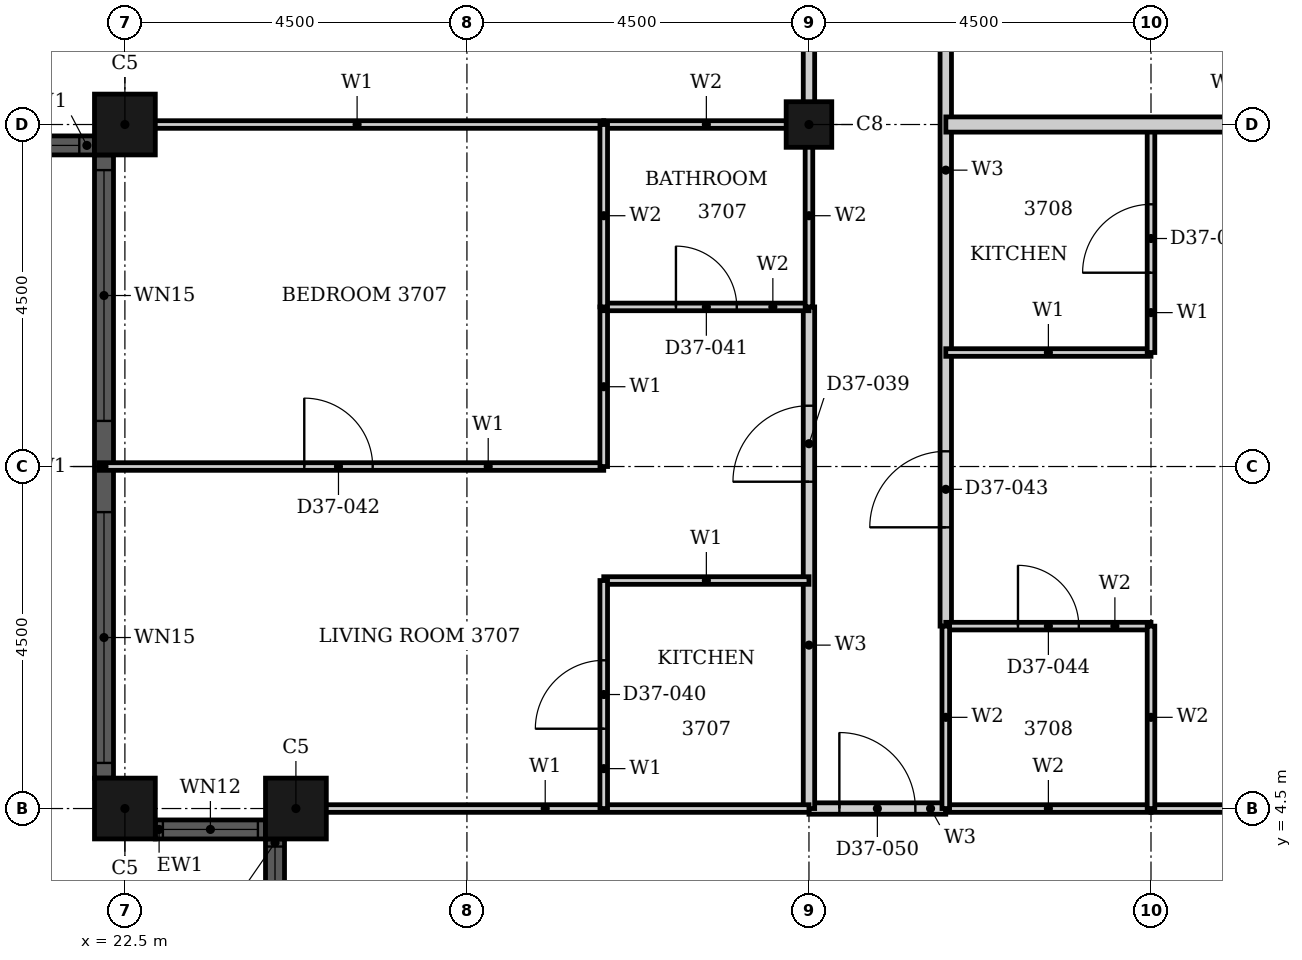
"""IFC4 building model, lengths in metres.
Left out: names, types, materials, properties, quantities, classifications, styles, units other than length and angle.
Written with IfcOpenShell. Run it as: python <this file> out.ifc"""

import sys

from ifc_helpers import new_model, si_unit, direction, frame, frame_2d, origin, origin_2d, place, context, subcontext, project, spatial, rectangle, hollow_rectangle, extrude, element, fill, save


model = new_model("IFC4")
c1 = context("Model", 3, precision=1e-05, world=origin(), true_north=direction((0.0, 1.0)))
c2 = subcontext(c1, "Body", "Model", "MODEL_VIEW")
j1 = project(units=[si_unit("LENGTHUNIT", "METRE"), si_unit("PLANEANGLEUNIT", "RADIAN")], contexts=[c1])
p1 = place(None, origin())
s1 = spatial("IfcSite", under=j1, at=p1, CompositionType="ELEMENT")
p2 = place(p1, origin())
s2 = spatial("IfcBuilding", under=s1, at=p2, CompositionType="ELEMENT")
p3 = place(p2, frame((0.0, 0.0, 150.6)))
s3 = spatial("IfcBuildingStorey", under=s2, at=p3, CompositionType="ELEMENT", Elevation=150.6)
for number, where, z_axis, x_axis in (
    (1, (22.5, 4.5, 0.0), (0.0, 0.0, 1.0), (1.0, 0.0, 0.0)),
    (2, (24.75, 4.5, 0.0), (0.0, 0.0, 1.0), (1.0, 0.0, 0.0)),
    (3, (22.5, 13.5, 0.0), (0.0, 0.0, 1.0), (1.0, 0.0, 0.0)),
):
    element("IfcColumn", number, at=place(p3, frame(where, z_axis=z_axis, x_axis=x_axis)), inside=s3, PredefinedType="COLUMN", context=c2, shape_type="SweptSolid", body=[
        extrude(hollow_rectangle(XDim=0.8, YDim=0.8, WallThickness=0.025, at=origin_2d()), origin(), (0.0, 0.0, 1.0), 3.7),
    ])
p4 = place(p3, frame((31.5, 13.5, 0.0), z_axis=(0.0, 0.0, 1.0), x_axis=(1.0, 0.0, 0.0)))
e4 = element("IfcColumn", 4, at=p4, inside=s3, PredefinedType="COLUMN", context=c2, shape_type="SweptSolid", body=[
    extrude(hollow_rectangle(XDim=0.6, YDim=0.6, WallThickness=0.02, at=origin_2d()), origin(), (0.0, 0.0, 1.0), 3.7),
])
p5 = place(p3, frame((22.9, 4.225, 0.0), z_axis=(0.0, 0.0, 1.0), x_axis=(1.0, 0.0, 0.0)))
e5 = element("IfcWall", 5, at=p5, inside=s3, PredefinedType="SOLIDWALL", context=c2, shape_type="SweptSolid", body=[
    extrude(rectangle(XDim=1.45, YDim=0.25, at=frame_2d((0.725, 0.0))), origin(), (0.0, 0.0, 1.0), 3.7),
])
p6 = place(p5, frame((0.1, 0.0, 0.9)))
e6 = element("IfcOpeningElement", 6, at=p6, cuts=e5, PredefinedType="OPENING", context=c2, shape_type="SweptSolid", body=[
    extrude(rectangle(XDim=1.25, YDim=2.08, at=frame_2d((0.625, 1.04))), frame((0.0, 0.135, 0.0), z_axis=(0.0, -1.0, 0.0), x_axis=(1.0, 0.0, 0.0)), (0.0, 0.0, 1.0), 0.27),
])
p7 = place(p3, frame((24.475, 4.1, 0.0), z_axis=(0.0, 0.0, 1.0), x_axis=(0.0, -1.0, 0.0)))
e7 = element("IfcWall", 7, at=p7, inside=s3, PredefinedType="SOLIDWALL", context=c2, shape_type="SweptSolid", body=[
    extrude(rectangle(XDim=1.45, YDim=0.25, at=frame_2d((0.725, 0.0))), origin(), (0.0, 0.0, 1.0), 3.7),
])
p8 = place(p7, frame((0.1, 0.0, 0.9)))
e8 = element("IfcOpeningElement", 8, at=p8, cuts=e7, PredefinedType="OPENING", context=c2, shape_type="SweptSolid", body=[
    extrude(rectangle(XDim=1.25, YDim=1.85, at=frame_2d((0.625, 0.925))), frame((0.0, 0.135, 0.0), z_axis=(0.0, -1.0, 0.0), x_axis=(1.0, 0.0, 0.0)), (0.0, 0.0, 1.0), 0.27),
])
p9 = place(p3, frame((18.4, 13.225, 0.0), z_axis=(0.0, 0.0, 1.0), x_axis=(1.0, 0.0, 0.0)))
e9 = element("IfcWall", 9, at=p9, inside=s3, PredefinedType="SOLIDWALL", context=c2, shape_type="SweptSolid", body=[
    extrude(rectangle(XDim=3.7, YDim=0.25, at=frame_2d((1.85, 0.0))), origin(), (0.0, 0.0, 1.0), 3.7),
])
p10 = place(p9, frame((0.2, 0.0, 0.45)))
e10 = element("IfcOpeningElement", 10, at=p10, cuts=e9, PredefinedType="OPENING", context=c2, shape_type="SweptSolid", body=[
    extrude(rectangle(XDim=3.3, YDim=2.3, at=frame_2d((1.65, 1.15))), frame((0.0, 0.135, 0.0), z_axis=(0.0, -1.0, 0.0), x_axis=(1.0, 0.0, 0.0)), (0.0, 0.0, 1.0), 0.27),
])
p11 = place(p3, frame((22.225, 13.1, 0.0), z_axis=(0.0, 0.0, 1.0), x_axis=(0.0, -1.0, 0.0)))
e11 = element("IfcWall", 11, at=p11, inside=s3, PredefinedType="SOLIDWALL", context=c2, shape_type="SweptSolid", body=[
    extrude(rectangle(XDim=8.2, YDim=0.25, at=frame_2d((4.1, 0.0))), origin(), (0.0, 0.0, 1.0), 3.7),
])
p12 = place(p11, frame((0.2, 0.0, 0.45)))
e12 = element("IfcOpeningElement", 12, at=p12, cuts=e11, PredefinedType="OPENING", context=c2, shape_type="SweptSolid", body=[
    extrude(rectangle(XDim=3.3, YDim=2.3, at=frame_2d((1.65, 1.15))), frame((0.0, 0.135, 0.0), z_axis=(0.0, -1.0, 0.0), x_axis=(1.0, 0.0, 0.0)), (0.0, 0.0, 1.0), 0.27),
])
p13 = place(p11, frame((4.7, 0.0, 0.45)))
e13 = element("IfcOpeningElement", 13, at=p13, cuts=e11, PredefinedType="OPENING", context=c2, shape_type="SweptSolid", body=[
    extrude(rectangle(XDim=3.3, YDim=2.3, at=frame_2d((1.65, 1.15))), frame((0.0, 0.135, 0.0), z_axis=(0.0, -1.0, 0.0), x_axis=(1.0, 0.0, 0.0)), (0.0, 0.0, 1.0), 0.27),
])
p14 = place(p3, frame((31.5, 4.5, 0.0), z_axis=(0.0, 0.0, 1.0), x_axis=(1.0, 0.0, 0.0)))
e14 = element("IfcWall", 14, at=p14, inside=s3, PredefinedType="PARTITIONING", context=c2, shape_type="SweptSolid", body=[
    extrude(rectangle(XDim=1.8, YDim=0.15, at=frame_2d((0.9, 0.0))), origin(), (0.0, 0.0, 1.0), 3.4),
])
p15 = place(p14, frame((0.4, 0.0, 0.0)))
e15 = element("IfcOpeningElement", 15, at=p15, cuts=e14, PredefinedType="OPENING", context=c2, shape_type="SweptSolid", body=[
    extrude(rectangle(XDim=1.0, YDim=2.1, at=frame_2d((0.5, 1.05))), frame((0.0, 0.085, 0.0), z_axis=(0.0, -1.0, 0.0), x_axis=(1.0, 0.0, 0.0)), (0.0, 0.0, 1.0), 0.17),
])
p16 = place(p3, frame((31.5, 4.5, 0.0), z_axis=(0.0, 0.0, 1.0), x_axis=(0.0, 1.0, 0.0)))
e16 = element("IfcWall", 16, at=p16, inside=s3, PredefinedType="PARTITIONING", context=c2, shape_type="SweptSolid", body=[
    extrude(rectangle(XDim=6.6, YDim=0.15, at=frame_2d((3.3, 0.0))), origin(), (0.0, 0.0, 1.0), 2.68),
])
p17 = place(p16, frame((4.3, 0.0, 0.0)))
e17 = element("IfcOpeningElement", 17, at=p17, cuts=e16, PredefinedType="OPENING", context=c2, shape_type="SweptSolid", body=[
    extrude(rectangle(XDim=1.0, YDim=2.2, at=frame_2d((0.5, 1.1))), frame((0.0, 0.085, 0.0), z_axis=(0.0, -1.0, 0.0), x_axis=(1.0, 0.0, 0.0)), (0.0, 0.0, 1.0), 0.17),
])
p18 = place(p3, frame((31.5, 13.5, 0.0), z_axis=(0.0, 0.0, 1.0), x_axis=(0.0, 1.0, 0.0)))
e18 = element("IfcWall", 18, at=p18, inside=s3, PredefinedType="PARTITIONING", context=c2, shape_type="SweptSolid", body=[
    extrude(rectangle(XDim=7.2, YDim=0.15, at=frame_2d((3.6, 0.0))), origin(), (0.0, 0.0, 1.0), 3.4),
])
p19 = place(p3, frame((33.3, 6.9, 0.0), z_axis=(0.0, 0.0, 1.0), x_axis=(0.0, 1.0, 0.0)))
e19 = element("IfcWall", 19, at=p19, inside=s3, PredefinedType="PARTITIONING", context=c2, shape_type="SweptSolid", body=[
    extrude(rectangle(XDim=13.799, YDim=0.15, at=frame_2d((6.899, 0.0))), origin(), (0.0, 0.0, 1.0), 3.4),
])
p20 = place(p19, frame((9.699, 0.0, 0.0)))
e20 = element("IfcOpeningElement", 20, at=p20, cuts=e19, PredefinedType="OPENING", context=c2, shape_type="SweptSolid", body=[
    extrude(rectangle(XDim=1.0, YDim=2.2, at=frame_2d((0.5, 1.1))), frame((0.0, 0.085, 0.0), z_axis=(0.0, -1.0, 0.0), x_axis=(1.0, 0.0, 0.0)), (0.0, 0.0, 1.0), 0.17),
])
p21 = place(p19, frame((1.3, 0.0, 0.0)))
e21 = element("IfcOpeningElement", 21, at=p21, cuts=e19, PredefinedType="OPENING", context=c2, shape_type="SweptSolid", body=[
    extrude(rectangle(XDim=1.0, YDim=2.2, at=frame_2d((0.5, 1.1))), frame((0.0, 0.085, 0.0), z_axis=(0.0, -1.0, 0.0), x_axis=(1.0, 0.0, 0.0)), (0.0, 0.0, 1.0), 0.17),
])
p22 = place(p3, frame((33.3, 10.5, 0.0), z_axis=(0.0, 0.0, 1.0), x_axis=(1.0, 0.0, 0.0)))
e22 = element("IfcWall", 22, at=p22, inside=s3, PredefinedType="PARTITIONING", context=c2, shape_type="SweptSolid", body=[
    extrude(rectangle(XDim=2.7, YDim=0.1, at=frame_2d((1.35, 0.0))), origin(), (0.0, 0.0, 1.0), 3.4),
])
p23 = place(p3, frame((22.31, 13.5, 0.0), z_axis=(0.0, 0.0, 1.0), x_axis=(1.0, 0.0, 0.0)))
e23 = element("IfcWall", 23, at=p23, inside=s3, PredefinedType="PARTITIONING", context=c2, shape_type="SweptSolid", body=[
    extrude(rectangle(XDim=6.49, YDim=0.1, at=frame_2d((3.245, 0.0))), origin(), (0.0, 0.0, 1.0), 2.48),
])
p24 = place(p3, frame((36.0, 4.5, 0.0), z_axis=(0.0, 0.0, 1.0), x_axis=(1.0, 0.0, 0.0)))
e24 = element("IfcWall", 24, at=p24, inside=s3, PredefinedType="PARTITIONING", context=c2, shape_type="SweptSolid", body=[
    extrude(rectangle(XDim=2.44, YDim=0.1, at=frame_2d((1.22, 0.0))), origin(), (0.0, 0.0, 1.0), 3.4),
])
p25 = place(p3, frame((24.56, 4.5, 0.0), z_axis=(0.0, 0.0, 1.0), x_axis=(1.0, 0.0, 0.0)))
e25 = element("IfcWall", 25, at=p25, inside=s3, PredefinedType="PARTITIONING", context=c2, shape_type="SweptSolid", body=[
    extrude(rectangle(XDim=6.94, YDim=0.1, at=frame_2d((3.47, 0.0))), origin(), (0.0, 0.0, 1.0), 3.4),
])
p26 = place(p3, frame((28.8, 7.5, 0.0), z_axis=(0.0, 0.0, 1.0), x_axis=(1.0, 0.0, 0.0)))
e26 = element("IfcWall", 26, at=p26, inside=s3, PredefinedType="PARTITIONING", context=c2, shape_type="SweptSolid", body=[
    extrude(rectangle(XDim=2.7, YDim=0.1, at=frame_2d((1.35, 0.0))), origin(), (0.0, 0.0, 1.0), 3.4),
])
p27 = place(p3, frame((22.16, 9.0, 0.0), z_axis=(0.0, 0.0, 1.0), x_axis=(1.0, 0.0, 0.0)))
e27 = element("IfcWall", 27, at=p27, inside=s3, PredefinedType="PARTITIONING", context=c2, shape_type="SweptSolid", body=[
    extrude(rectangle(XDim=6.64, YDim=0.1, at=frame_2d((3.32, 0.0))), origin(), (0.0, 0.0, 1.0), 3.4),
])
p28 = place(p27, frame((2.7, 0.0, 0.0)))
e28 = element("IfcOpeningElement", 28, at=p28, cuts=e27, PredefinedType="OPENING", context=c2, shape_type="SweptSolid", body=[
    extrude(rectangle(XDim=0.9, YDim=2.1, at=frame_2d((0.45, 1.05))), frame((0.0, 0.06, 0.0), z_axis=(0.0, -1.0, 0.0), x_axis=(1.0, 0.0, 0.0)), (0.0, 0.0, 1.0), 0.12),
])
p29 = place(p3, frame((28.8, 9.0, 0.0), z_axis=(0.0, 0.0, 1.0), x_axis=(0.0, 1.0, 0.0)))
e29 = element("IfcWall", 29, at=p29, inside=s3, PredefinedType="PARTITIONING", context=c2, shape_type="SweptSolid", body=[
    extrude(rectangle(XDim=2.1, YDim=0.1, at=frame_2d((1.05, 0.0))), origin(), (0.0, 0.0, 1.0), 3.4),
])
p30 = place(p3, frame((28.8, 4.5, 0.0), z_axis=(0.0, 0.0, 1.0), x_axis=(0.0, 1.0, 0.0)))
e30 = element("IfcWall", 30, at=p30, inside=s3, PredefinedType="PARTITIONING", context=c2, shape_type="SweptSolid", body=[
    extrude(rectangle(XDim=3.0, YDim=0.1, at=frame_2d((1.5, 0.0))), origin(), (0.0, 0.0, 1.0), 3.4),
])
p31 = place(p30, frame((1.05, 0.0, 0.0)))
e31 = element("IfcOpeningElement", 31, at=p31, cuts=e30, PredefinedType="OPENING", context=c2, shape_type="SweptSolid", body=[
    extrude(rectangle(XDim=0.9, YDim=2.1, at=frame_2d((0.45, 1.05))), frame((0.0, 0.06, 0.0), z_axis=(0.0, -1.0, 0.0), x_axis=(1.0, 0.0, 0.0)), (0.0, 0.0, 1.0), 0.12),
])
p32 = place(p3, frame((36.0, 10.5, 0.0), z_axis=(0.0, 0.0, 1.0), x_axis=(0.0, 1.0, 0.0)))
e32 = element("IfcWall", 32, at=p32, inside=s3, PredefinedType="PARTITIONING", context=c2, shape_type="SweptSolid", body=[
    extrude(rectangle(XDim=3.0, YDim=0.1, at=frame_2d((1.5, 0.0))), origin(), (0.0, 0.0, 1.0), 2.68),
])
p33 = place(p32, frame((1.05, 0.0, 0.0)))
e33 = element("IfcOpeningElement", 33, at=p33, cuts=e32, PredefinedType="OPENING", context=c2, shape_type="SweptSolid", body=[
    extrude(rectangle(XDim=0.9, YDim=2.1, at=frame_2d((0.45, 1.05))), frame((0.0, 0.06, 0.0), z_axis=(0.0, -1.0, 0.0), x_axis=(1.0, 0.0, 0.0)), (0.0, 0.0, 1.0), 0.12),
])
p34 = place(p3, frame((33.301, 13.5, 0.0), z_axis=(0.0, 0.0, 1.0), x_axis=(1.0, 0.0, 0.0)))
e34 = element("IfcWall", 34, at=p34, inside=s3, PredefinedType="PARTITIONING", context=c2, shape_type="SweptSolid", body=[
    extrude(rectangle(XDim=7.389, YDim=0.2, at=frame_2d((3.694, 0.0))), origin(), (0.0, 0.0, 1.0), 2.48),
])
p35 = place(p3, frame((28.8, 11.1, 0.0), z_axis=(0.0, 0.0, 1.0), x_axis=(1.0, 0.0, 0.0)))
e35 = element("IfcWall", 35, at=p35, inside=s3, PredefinedType="PARTITIONING", context=c2, shape_type="SweptSolid", body=[
    extrude(rectangle(XDim=2.7, YDim=0.1, at=frame_2d((1.35, 0.0))), origin(), (0.0, 0.0, 1.0), 3.4),
])
p36 = place(p35, frame((0.95, 0.0, 0.0)))
e36 = element("IfcOpeningElement", 36, at=p36, cuts=e35, PredefinedType="OPENING", context=c2, shape_type="SweptSolid", body=[
    extrude(rectangle(XDim=0.8, YDim=2.1, at=frame_2d((0.4, 1.05))), frame((0.0, 0.06, 0.0), z_axis=(0.0, -1.0, 0.0), x_axis=(1.0, 0.0, 0.0)), (0.0, 0.0, 1.0), 0.12),
])
p37 = place(p3, frame((28.8, 13.5, 0.0), z_axis=(0.0, 0.0, 1.0), x_axis=(1.0, 0.0, 0.0)))
e37 = element("IfcWall", 37, at=p37, inside=s3, PredefinedType="PARTITIONING", context=c2, shape_type="SweptSolid", body=[
    extrude(rectangle(XDim=2.7, YDim=0.1, at=frame_2d((1.35, 0.0))), origin(), (0.0, 0.0, 1.0), 2.48),
])
p38 = place(p3, frame((33.3, 4.5, 0.0), z_axis=(0.0, 0.0, 1.0), x_axis=(1.0, 0.0, 0.0)))
e38 = element("IfcWall", 38, at=p38, inside=s3, PredefinedType="PARTITIONING", context=c2, shape_type="SweptSolid", body=[
    extrude(rectangle(XDim=2.7, YDim=0.1, at=frame_2d((1.35, 0.0))), origin(), (0.0, 0.0, 1.0), 3.4),
])
p39 = place(p3, frame((33.3, 6.9, 0.0), z_axis=(0.0, 0.0, 1.0), x_axis=(1.0, 0.0, 0.0)))
e39 = element("IfcWall", 39, at=p39, inside=s3, PredefinedType="PARTITIONING", context=c2, shape_type="SweptSolid", body=[
    extrude(rectangle(XDim=2.7, YDim=0.1, at=frame_2d((1.35, 0.0))), origin(), (0.0, 0.0, 1.0), 3.4),
])
p40 = place(p39, frame((0.95, 0.0, 0.0)))
e40 = element("IfcOpeningElement", 40, at=p40, cuts=e39, PredefinedType="OPENING", context=c2, shape_type="SweptSolid", body=[
    extrude(rectangle(XDim=0.8, YDim=2.1, at=frame_2d((0.4, 1.05))), frame((0.0, 0.06, 0.0), z_axis=(0.0, -1.0, 0.0), x_axis=(1.0, 0.0, 0.0)), (0.0, 0.0, 1.0), 0.12),
])
p41 = place(p3, frame((28.8, 11.1, 0.0), z_axis=(0.0, 0.0, 1.0), x_axis=(0.0, 1.0, 0.0)))
e41 = element("IfcWall", 41, at=p41, inside=s3, PredefinedType="PARTITIONING", context=c2, shape_type="SweptSolid", body=[
    extrude(rectangle(XDim=2.4, YDim=0.1, at=frame_2d((1.2, 0.0))), origin(), (0.0, 0.0, 1.0), 3.4),
])
p42 = place(p3, frame((31.5, 11.1, 0.0), z_axis=(0.0, 0.0, 1.0), x_axis=(0.0, 1.0, 0.0)))
e42 = element("IfcWall", 42, at=p42, inside=s3, PredefinedType="PARTITIONING", context=c2, shape_type="SweptSolid", body=[
    extrude(rectangle(XDim=2.4, YDim=0.1, at=frame_2d((1.2, 0.0))), origin(), (0.0, 0.0, 1.0), 2.68),
])
p43 = place(p3, frame((33.3, 4.5, 0.0), z_axis=(0.0, 0.0, 1.0), x_axis=(0.0, 1.0, 0.0)))
e43 = element("IfcWall", 43, at=p43, inside=s3, PredefinedType="PARTITIONING", context=c2, shape_type="SweptSolid", body=[
    extrude(rectangle(XDim=2.4, YDim=0.1, at=frame_2d((1.2, 0.0))), origin(), (0.0, 0.0, 1.0), 3.4),
])
p44 = place(p3, frame((36.0, 4.5, 0.0), z_axis=(0.0, 0.0, 1.0), x_axis=(0.0, 1.0, 0.0)))
e44 = element("IfcWall", 44, at=p44, inside=s3, PredefinedType="PARTITIONING", context=c2, shape_type="SweptSolid", body=[
    extrude(rectangle(XDim=2.4, YDim=0.1, at=frame_2d((1.2, 0.0))), origin(), (0.0, 0.0, 1.0), 2.68),
])
p45 = place(p6, origin())
e45 = element("IfcWindow", 45, at=p45, inside=s3, PartitioningType="SINGLE_PANEL", PredefinedType="WINDOW", context=c2, shape_type="SweptSolid", body=[
    extrude(rectangle(XDim=1.25, YDim=2.08, at=frame_2d((0.625, 1.04))), frame((0.0, 0.03, 0.0), z_axis=(0.0, -1.0, 0.0), x_axis=(1.0, 0.0, 0.0)), (0.0, 0.0, 1.0), 0.06),
])
fill(e6, e45)
p46 = place(p8, origin())
e46 = element("IfcWindow", 46, at=p46, inside=s3, PartitioningType="SINGLE_PANEL", PredefinedType="WINDOW", context=c2, shape_type="SweptSolid", body=[
    extrude(rectangle(XDim=1.25, YDim=1.85, at=frame_2d((0.625, 0.925))), frame((0.0, 0.03, 0.0), z_axis=(0.0, -1.0, 0.0), x_axis=(1.0, 0.0, 0.0)), (0.0, 0.0, 1.0), 0.06),
])
fill(e8, e46)
p47 = place(p10, origin())
e47 = element("IfcWindow", 47, at=p47, inside=s3, PartitioningType="SINGLE_PANEL", PredefinedType="WINDOW", context=c2, shape_type="SweptSolid", body=[
    extrude(rectangle(XDim=3.3, YDim=2.3, at=frame_2d((1.65, 1.15))), frame((0.0, 0.03, 0.0), z_axis=(0.0, -1.0, 0.0), x_axis=(1.0, 0.0, 0.0)), (0.0, 0.0, 1.0), 0.06),
])
fill(e10, e47)
p48 = place(p12, origin())
e48 = element("IfcWindow", 48, at=p48, inside=s3, PartitioningType="SINGLE_PANEL", PredefinedType="WINDOW", context=c2, shape_type="SweptSolid", body=[
    extrude(rectangle(XDim=3.3, YDim=2.3, at=frame_2d((1.65, 1.15))), frame((0.0, 0.03, 0.0), z_axis=(0.0, -1.0, 0.0), x_axis=(1.0, 0.0, 0.0)), (0.0, 0.0, 1.0), 0.06),
])
fill(e12, e48)
p49 = place(p13, origin())
e49 = element("IfcWindow", 49, at=p49, inside=s3, PartitioningType="SINGLE_PANEL", PredefinedType="WINDOW", context=c2, shape_type="SweptSolid", body=[
    extrude(rectangle(XDim=3.3, YDim=2.3, at=frame_2d((1.65, 1.15))), frame((0.0, 0.03, 0.0), z_axis=(0.0, -1.0, 0.0), x_axis=(1.0, 0.0, 0.0)), (0.0, 0.0, 1.0), 0.06),
])
fill(e13, e49)
p50 = place(p17, origin())
e50 = element("IfcDoor", 50, at=p50, inside=s3, OperationType="SINGLE_SWING_LEFT", PredefinedType="DOOR", context=c2, shape_type="SweptSolid", body=[
    extrude(rectangle(XDim=1.0, YDim=2.2, at=frame_2d((0.5, 1.1))), frame((0.0, 0.025, 0.0), z_axis=(0.0, -1.0, 0.0), x_axis=(1.0, 0.0, 0.0)), (0.0, 0.0, 1.0), 0.05),
])
fill(e17, e50)
p51 = place(p31, origin())
e51 = element("IfcDoor", 51, at=p51, inside=s3, OperationType="SINGLE_SWING_LEFT", PredefinedType="DOOR", context=c2, shape_type="SweptSolid", body=[
    extrude(rectangle(XDim=0.9, YDim=2.1, at=frame_2d((0.45, 1.05))), frame((0.0, 0.025, 0.0), z_axis=(0.0, -1.0, 0.0), x_axis=(1.0, 0.0, 0.0)), (0.0, 0.0, 1.0), 0.05),
])
fill(e31, e51)
p52 = place(p36, origin())
e52 = element("IfcDoor", 52, at=p52, inside=s3, OperationType="SINGLE_SWING_LEFT", PredefinedType="DOOR", context=c2, shape_type="SweptSolid", body=[
    extrude(rectangle(XDim=0.8, YDim=2.1, at=frame_2d((0.4, 1.05))), frame((0.0, 0.025, 0.0), z_axis=(0.0, -1.0, 0.0), x_axis=(1.0, 0.0, 0.0)), (0.0, 0.0, 1.0), 0.05),
])
fill(e36, e52)
p53 = place(p28, origin())
e53 = element("IfcDoor", 53, at=p53, inside=s3, OperationType="SINGLE_SWING_LEFT", PredefinedType="DOOR", context=c2, shape_type="SweptSolid", body=[
    extrude(rectangle(XDim=0.9, YDim=2.1, at=frame_2d((0.45, 1.05))), frame((0.0, 0.025, 0.0), z_axis=(0.0, -1.0, 0.0), x_axis=(1.0, 0.0, 0.0)), (0.0, 0.0, 1.0), 0.05),
])
fill(e28, e53)
p54 = place(p21, origin())
e54 = element("IfcDoor", 54, at=p54, inside=s3, OperationType="SINGLE_SWING_LEFT", PredefinedType="DOOR", context=c2, shape_type="SweptSolid", body=[
    extrude(rectangle(XDim=1.0, YDim=2.2, at=frame_2d((0.5, 1.1))), frame((0.0, 0.025, 0.0), z_axis=(0.0, -1.0, 0.0), x_axis=(1.0, 0.0, 0.0)), (0.0, 0.0, 1.0), 0.05),
])
fill(e21, e54)
p55 = place(p40, origin())
e55 = element("IfcDoor", 55, at=p55, inside=s3, OperationType="SINGLE_SWING_LEFT", PredefinedType="DOOR", context=c2, shape_type="SweptSolid", body=[
    extrude(rectangle(XDim=0.8, YDim=2.1, at=frame_2d((0.4, 1.05))), frame((0.0, 0.025, 0.0), z_axis=(0.0, -1.0, 0.0), x_axis=(1.0, 0.0, 0.0)), (0.0, 0.0, 1.0), 0.05),
])
fill(e40, e55)
p56 = place(p33, origin())
e56 = element("IfcDoor", 56, at=p56, inside=s3, OperationType="SINGLE_SWING_RIGHT", PredefinedType="DOOR", context=c2, shape_type="SweptSolid", body=[
    extrude(rectangle(XDim=0.9, YDim=2.1, at=frame_2d((0.45, 1.05))), frame((0.0, 0.025, 0.0), z_axis=(0.0, -1.0, 0.0), x_axis=(1.0, 0.0, 0.0)), (0.0, 0.0, 1.0), 0.05),
])
fill(e33, e56)
p57 = place(p15, origin())
e57 = element("IfcDoor", 57, at=p57, inside=s3, OperationType="SINGLE_SWING_LEFT", PredefinedType="DOOR", context=c2, shape_type="SweptSolid", body=[
    extrude(rectangle(XDim=1.0, YDim=2.1, at=frame_2d((0.5, 1.05))), frame((0.0, 0.025, 0.0), z_axis=(0.0, -1.0, 0.0), x_axis=(1.0, 0.0, 0.0)), (0.0, 0.0, 1.0), 0.05),
])
fill(e15, e57)
save(model, sys.argv[1])
